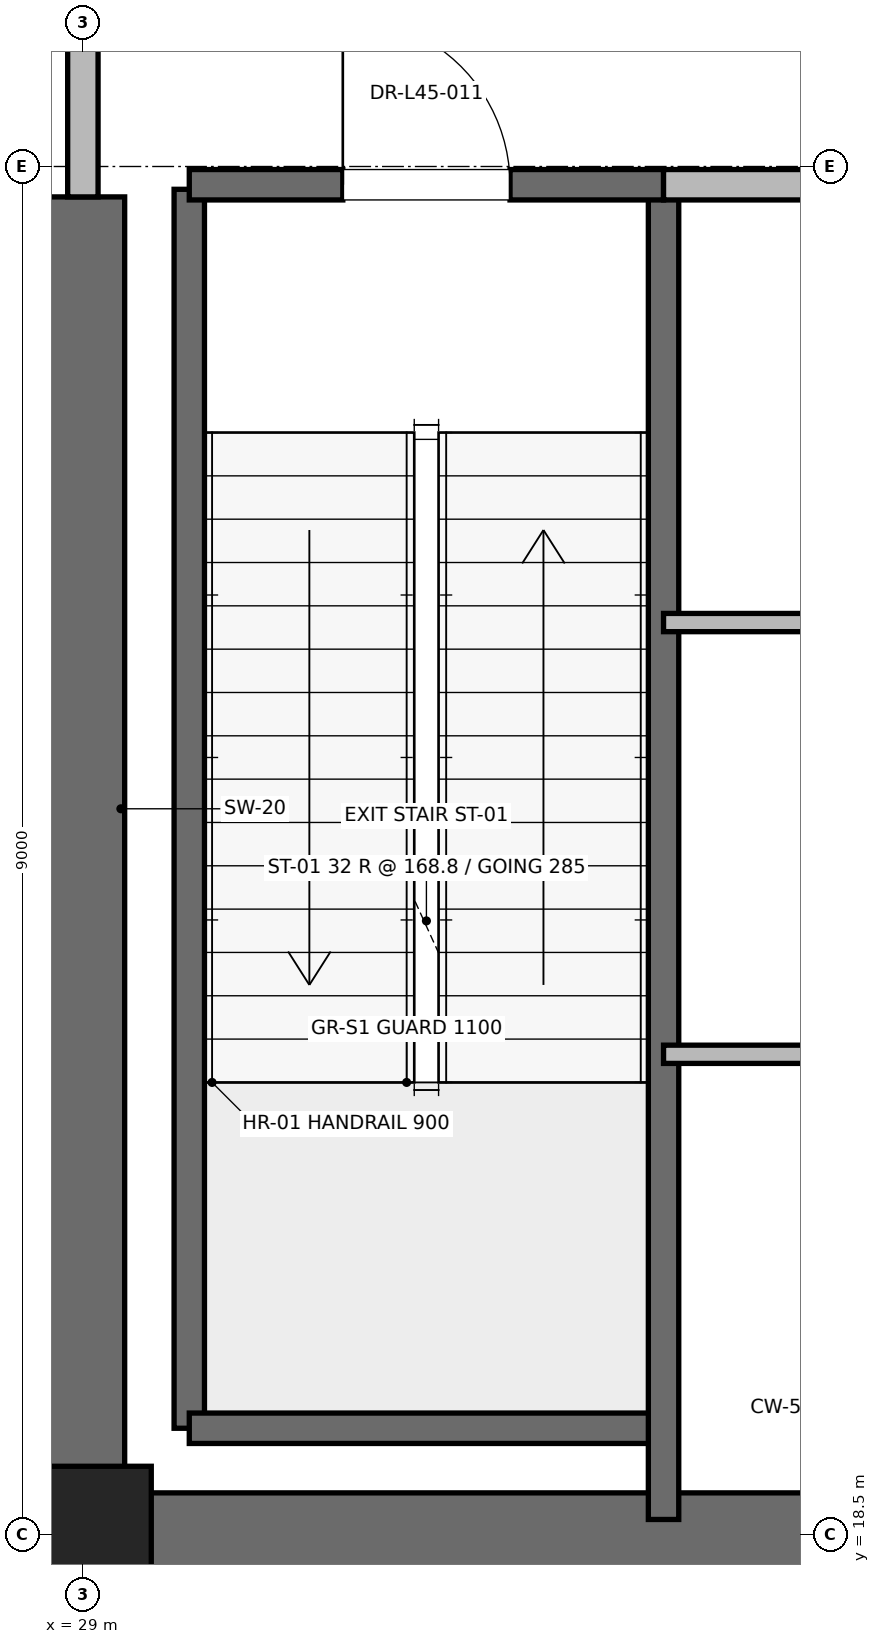
"""IFC4 building model, lengths in metres.
Left out: names, types, materials, properties, quantities, classifications, styles, units other than length and angle.
Written with IfcOpenShell. Run it as: python <this file> out.ifc"""

import sys

from ifc_helpers import new_model, si_unit, direction, frame, frame_2d, origin, origin_2d, place, context, subcontext, project, spatial, rectangle, extrude, element, fill, save


model = new_model("IFC4")
c1 = context("Model", 3, precision=1e-05, world=origin(), true_north=direction((0.0, 1.0)))
c2 = subcontext(c1, "Body", "Model", "MODEL_VIEW")
j1 = project(units=[si_unit("LENGTHUNIT", "METRE"), si_unit("PLANEANGLEUNIT", "RADIAN")], contexts=[c1])
p1 = place(None, origin())
s1 = spatial("IfcSite", under=j1, at=p1, CompositionType="ELEMENT")
p2 = place(p1, origin())
s2 = spatial("IfcBuilding", under=s1, at=p2, CompositionType="ELEMENT")
p3 = place(p2, frame((0.0, 0.0, 194.8)))
s3 = spatial("IfcBuildingStorey", under=s2, at=p3, CompositionType="ELEMENT", Elevation=194.8)
p4 = place(p3, frame((29.0, 18.5, 0.0), z_axis=(0.0, 0.0, 1.0), x_axis=(1.0, 0.0, 0.0)))
e1 = element("IfcColumn", 1, at=p4, inside=s3, PredefinedType="PILASTER", context=c2, shape_type="SweptSolid", body=[
    extrude(rectangle(XDim=0.9, YDim=0.9, at=origin_2d()), origin(), (0.0, 0.0, 1.0), 5.4),
])
p5 = place(p3, frame((29.0, 18.5, 0.0), z_axis=(0.0, 0.0, 1.0), x_axis=(1.0, 0.0, 0.0)))
e2 = element("IfcWall", 2, at=p5, inside=s3, PredefinedType="SHEAR", context=c2, shape_type="SweptSolid", body=[
    extrude(rectangle(XDim=9.2, YDim=0.55, at=frame_2d((4.6, 0.0))), origin(), (0.0, 0.0, 1.0), 5.1),
])
p6 = place(p3, frame((29.0, 18.5, 0.0), z_axis=(0.0, 0.0, 1.0), x_axis=(0.0, 1.0, 0.0)))
e3 = element("IfcWall", 3, at=p6, inside=s3, PredefinedType="SHEAR", context=c2, shape_type="SweptSolid", body=[
    extrude(rectangle(XDim=8.8, YDim=0.55, at=frame_2d((4.4, 0.0))), origin(), (0.0, 0.0, 1.0), 5.1),
])
p7 = place(p3, frame((29.7, 19.2, 0.0), z_axis=(0.0, 0.0, 1.0), x_axis=(0.0, 1.0, 0.0)))
e4 = element("IfcWall", 4, at=p7, inside=s3, PredefinedType="SOLIDWALL", context=c2, shape_type="SweptSolid", body=[
    extrude(rectangle(XDim=8.15, YDim=0.2, at=frame_2d((4.075, 0.0))), origin(), (0.0, 0.0, 1.0), 5.1),
])
p8 = place(p3, frame((29.7, 19.2, 0.0), z_axis=(0.0, 0.0, 1.0), x_axis=(1.0, 0.0, 0.0)))
e5 = element("IfcWall", 5, at=p8, inside=s3, PredefinedType="SOLIDWALL", context=c2, shape_type="SweptSolid", body=[
    extrude(rectangle(XDim=3.12, YDim=0.2, at=frame_2d((1.56, 0.0))), origin(), (0.0, 0.0, 1.0), 5.1),
])
p9 = place(p3, frame((32.82, 18.6, 0.0), z_axis=(0.0, 0.0, 1.0), x_axis=(0.0, 1.0, 0.0)))
e6 = element("IfcWall", 6, at=p9, inside=s3, PredefinedType="SOLIDWALL", context=c2, shape_type="SweptSolid", body=[
    extrude(rectangle(XDim=8.78, YDim=0.2, at=frame_2d((4.39, 0.0))), origin(), (0.0, 0.0, 1.0), 5.1),
])
p10 = place(p3, frame((29.7, 27.38, 0.0), z_axis=(0.0, 0.0, 1.0), x_axis=(1.0, 0.0, 0.0)))
e7 = element("IfcWall", 7, at=p10, inside=s3, PredefinedType="SOLIDWALL", context=c2, shape_type="SweptSolid", body=[
    extrude(rectangle(XDim=3.12, YDim=0.2, at=frame_2d((1.56, 0.0))), origin(), (0.0, 0.0, 1.0), 5.1),
])
p11 = place(p10, frame((1.01, 0.0, 0.0)))
e8 = element("IfcOpeningElement", 8, at=p11, cuts=e7, PredefinedType="OPENING", context=c2, shape_type="SweptSolid", body=[
    extrude(rectangle(XDim=1.1, YDim=2.15, at=frame_2d((0.55, 1.075))), frame((0.0, 0.1, 0.0), z_axis=(0.0, -1.0, 0.0), x_axis=(1.0, 0.0, 0.0)), (0.0, 0.0, 1.0), 0.2),
])
p12 = place(p3, frame((29.0, 27.3, 0.0), z_axis=(0.0, 0.0, 1.0), x_axis=(0.0, 1.0, 0.0)))
e9 = element("IfcWall", 9, at=p12, inside=s3, PredefinedType="PARTITIONING", context=c2, shape_type="SweptSolid", body=[
    extrude(rectangle(XDim=3.4, YDim=0.2, at=frame_2d((1.7, 0.0))), origin(), (0.0, 0.0, 1.0), 4.08),
])
p13 = place(p12, frame((1.125, 0.0, 0.0)))
e10 = element("IfcOpeningElement", 10, at=p13, cuts=e9, PredefinedType="OPENING", context=c2, shape_type="SweptSolid", body=[
    extrude(rectangle(XDim=1.15, YDim=2.2, at=frame_2d((0.575, 1.1))), frame((0.0, 0.1, 0.0), z_axis=(0.0, -1.0, 0.0), x_axis=(1.0, 0.0, 0.0)), (0.0, 0.0, 1.0), 0.2),
])
p14 = place(p3, frame((32.82, 27.38, 0.0), z_axis=(0.0, 0.0, 1.0), x_axis=(1.0, 0.0, 0.0)))
e11 = element("IfcWall", 11, at=p14, inside=s3, PredefinedType="PARTITIONING", context=c2, shape_type="SweptSolid", body=[
    extrude(rectangle(XDim=5.62, YDim=0.2, at=frame_2d((2.81, 0.0))), origin(), (0.0, 0.0, 1.0), 5.1),
])
for number, where, z_axis, x_axis in (
    (12, (32.82, 21.66, 0.0), (0.0, 0.0, 1.0), (1.0, 0.0, 0.0)),
    (13, (32.82, 24.5, 0.0), (0.0, 0.0, 1.0), (1.0, 0.0, 0.0)),
):
    element("IfcWall", number, at=place(p3, frame(where, z_axis=z_axis, x_axis=x_axis)), inside=s3, PredefinedType="PARTITIONING", context=c2, shape_type="SweptSolid", body=[
        extrude(rectangle(XDim=5.23, YDim=0.12, at=frame_2d((2.615, 0.0))), origin(), (0.0, 0.0, 1.0), 2.85),
    ])
p15 = place(p11, origin())
e14 = element("IfcDoor", 14, at=p15, inside=s3, OperationType="SINGLE_SWING_LEFT", PredefinedType="DOOR", context=c2, shape_type="SweptSolid", body=[
    extrude(rectangle(XDim=1.1, YDim=2.15, at=frame_2d((0.55, 1.075))), frame((0.0, 0.025, 0.0), z_axis=(0.0, -1.0, 0.0), x_axis=(1.0, 0.0, 0.0)), (0.0, 0.0, 1.0), 0.05),
])
fill(e8, e14)
save(model, sys.argv[1])
